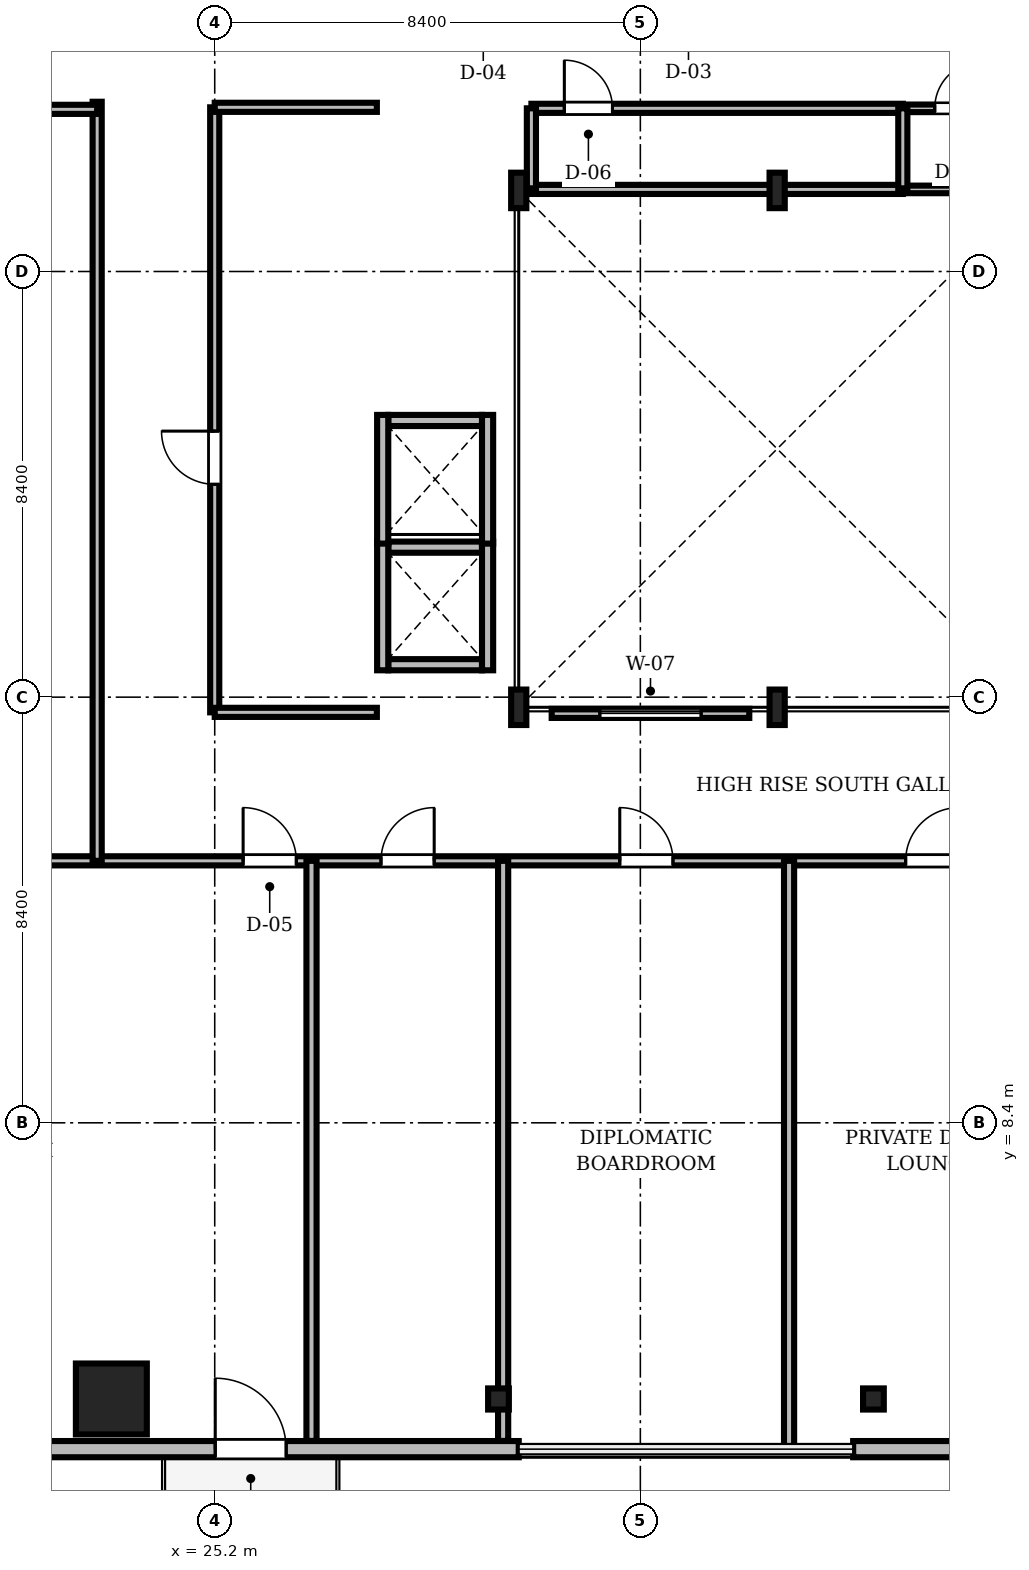
"""IFC4 building model, lengths in metres.
Left out: names, types, materials, properties, quantities, classifications, styles, units other than length and angle.
Written with IfcOpenShell. Run it as: python <this file> out.ifc"""

import sys

from ifc_helpers import new_model, si_unit, direction, frame, frame_2d, origin, origin_2d, place, context, subcontext, project, spatial, rectangle, i_section, extrude, source, transform, mapped, element, fill, save


model = new_model("IFC4")
c1 = context("Model", 3, precision=1e-05, world=origin(), true_north=direction((0.0, 1.0)))
c2 = subcontext(c1, "Body", "Model", "MODEL_VIEW")
j1 = project(units=[si_unit("LENGTHUNIT", "METRE"), si_unit("PLANEANGLEUNIT", "RADIAN")], contexts=[c1])
p1 = place(None, origin())
s1 = spatial("IfcSite", under=j1, at=p1, CompositionType="ELEMENT")
p2 = place(p1, origin())
s2 = spatial("IfcBuilding", under=s1, at=p2, CompositionType="ELEMENT")
p3 = place(p2, frame((0.0, 0.0, 233.55)))
s3 = spatial("IfcBuildingStorey", under=s2, at=p3, CompositionType="ELEMENT", Elevation=233.55)
m1 = source(origin(), c2, "Body", "SweptSolid", [
    extrude(i_section(OverallWidth=0.3, OverallDepth=0.7, WebThickness=0.017, FlangeThickness=0.032, FilletRadius=0.027, at=origin_2d()), origin(), (0.0, 0.0, 1.0), 3.1),
])
for number, where, z_axis, x_axis in (
    (1, (31.2, 16.6, 0.0), (0.0, 0.0, 1.0), (1.0, 0.0, 0.0)),
    (2, (36.3, 16.6, 0.0), (0.0, 0.0, 1.0), (1.0, 0.0, 0.0)),
    (3, (36.3, 26.8, 0.0), (0.0, 0.0, 1.0), (1.0, 0.0, 0.0)),
    (4, (31.2, 26.8, 0.0), (0.0, 0.0, 1.0), (1.0, 0.0, 0.0)),
):
    element("IfcColumn", number, at=place(p3, frame(where, z_axis=z_axis, x_axis=x_axis)), inside=s3, PredefinedType="COLUMN", context=c2, shape_type="MappedRepresentation", body=[
        mapped(m1, transform((0.0, 0.0, 0.0), scale=1.0)),
    ])
m2 = source(origin(), c2, "Body", "SweptSolid", [
    extrude(rectangle(XDim=1.4, YDim=1.4, at=origin_2d()), origin(), (0.0, 0.0, 1.0), 3.1),
])
p4 = place(p3, frame((23.16, 2.95, 0.0), z_axis=(0.0, 0.0, 1.0), x_axis=(1.0, 0.0, 0.0)))
e5 = element("IfcColumn", 5, at=p4, inside=s3, PredefinedType="COLUMN", context=c2, shape_type="MappedRepresentation", body=[
    mapped(m2, transform((0.0, 0.0, 0.0), scale=1.0)),
])
m3 = source(origin(), c2, "Body", "SweptSolid", [
    extrude(i_section(OverallWidth=0.409, OverallDepth=0.417, WebThickness=0.021, FlangeThickness=0.033, FilletRadius=0.015, at=origin_2d()), origin(), (0.0, 0.0, 1.0), 3.1),
])
for number, where, z_axis, x_axis in (
    (6, (30.8, 2.95, 0.0), (0.0, 0.0, 1.0), (1.0, 0.0, 0.0)),
    (7, (38.2, 2.95, 0.0), (0.0, 0.0, 1.0), (1.0, 0.0, 0.0)),
):
    element("IfcColumn", number, at=place(p3, frame(where, z_axis=z_axis, x_axis=x_axis)), inside=s3, PredefinedType="COLUMN", context=c2, shape_type="MappedRepresentation", body=[
        mapped(m3, transform((0.0, 0.0, 0.0), scale=1.0)),
    ])
m4 = source(origin(), c2, "Body", "SweptSolid", [
    extrude(rectangle(XDim=15.6, YDim=0.32, at=frame_2d((7.8, 0.0))), origin(), (0.0, 0.0, 1.0), 3.1),
])
p5 = place(p3, frame((15.6, 1.96, 0.0), z_axis=(0.0, 0.0, 1.0), x_axis=(1.0, 0.0, 0.0)))
e8 = element("IfcWall", 8, at=p5, inside=s3, PredefinedType="SOLIDWALL", context=c2, shape_type="MappedRepresentation", body=[
    mapped(m4, transform((0.0, 0.0, 0.0), scale=1.0)),
])
m5 = source(origin(), c2, "Body", "SweptSolid", [
    extrude(rectangle(XDim=1.4, YDim=2.3, at=frame_2d((0.7, 1.15))), frame((0.0, 0.17, 0.0), z_axis=(0.0, -1.0, 0.0), x_axis=(1.0, 0.0, 0.0)), (0.0, 0.0, 1.0), 0.34),
])
p6 = place(p5, frame((9.61, 0.0, 0.0)))
e9 = element("IfcOpeningElement", 9, at=p6, cuts=e8, PredefinedType="OPENING", context=c2, shape_type="MappedRepresentation", body=[
    mapped(m5, transform((0.0, 0.0, 0.0), scale=1.0)),
])
m6 = source(origin(), c2, "Body", "SweptSolid", [
    extrude(rectangle(XDim=2.8, YDim=2.4, at=frame_2d((1.4, 1.2))), frame((0.0, 0.17, 0.0), z_axis=(0.0, -1.0, 0.0), x_axis=(1.0, 0.0, 0.0)), (0.0, 0.0, 1.0), 0.34),
])
p7 = place(p5, frame((2.705, 0.0, 0.44)))
e10 = element("IfcOpeningElement", 10, at=p7, cuts=e8, PredefinedType="OPENING", context=c2, shape_type="MappedRepresentation", body=[
    mapped(m6, transform((0.0, 0.0, 0.0), scale=1.0)),
])
p8 = place(p3, frame((37.8, 1.96, 0.0), z_axis=(0.0, 0.0, 1.0), x_axis=(1.0, 0.0, 0.0)))
e11 = element("IfcWall", 11, at=p8, inside=s3, PredefinedType="SOLIDWALL", context=c2, shape_type="MappedRepresentation", body=[
    mapped(m4, transform((0.0, 0.0, 0.0), scale=1.0)),
])
p9 = place(p8, frame((10.545, 0.0, 0.44)))
e12 = element("IfcOpeningElement", 12, at=p9, cuts=e11, PredefinedType="OPENING", context=c2, shape_type="MappedRepresentation", body=[
    mapped(m6, transform((0.0, 0.0, 0.0), scale=1.0)),
])
m7 = source(origin(), c2, "Body", "SweptSolid", [
    extrude(rectangle(XDim=1.85, YDim=0.22, at=frame_2d((0.925, 0.0))), origin(), (0.0, 0.0, 1.0), 2.542),
])
p10 = place(p3, frame((28.625, 17.44, 0.0), z_axis=(0.0, 0.0, 1.0), x_axis=(1.0, 0.0, 0.0)))
e13 = element("IfcWall", 13, at=p10, inside=s3, PredefinedType="SOLIDWALL", context=c2, shape_type="MappedRepresentation", body=[
    mapped(m7, transform((0.0, 0.0, 0.0), scale=1.0)),
])
m8 = source(origin(), c2, "Body", "SweptSolid", [
    extrude(rectangle(XDim=1.85, YDim=0.22, at=frame_2d((0.925, 0.0))), origin(), (0.0, 0.0, 1.0), 3.1),
])
p11 = place(p3, frame((28.625, 19.76, 0.0), z_axis=(0.0, 0.0, 1.0), x_axis=(1.0, 0.0, 0.0)))
e14 = element("IfcWall", 14, at=p11, inside=s3, PredefinedType="SOLIDWALL", context=c2, shape_type="MappedRepresentation", body=[
    mapped(m8, transform((0.0, 0.0, 0.0), scale=1.0)),
])
m9 = source(origin(), c2, "Body", "SweptSolid", [
    extrude(rectangle(XDim=2.54, YDim=0.22, at=frame_2d((1.27, 0.0))), origin(), (0.0, 0.0, 1.0), 2.542),
])
p12 = place(p3, frame((28.515, 17.33, 0.0), z_axis=(0.0, 0.0, 1.0), x_axis=(0.0, 1.0, 0.0)))
e15 = element("IfcWall", 15, at=p12, inside=s3, PredefinedType="SOLIDWALL", context=c2, shape_type="MappedRepresentation", body=[
    mapped(m9, transform((0.0, 0.0, 0.0), scale=1.0)),
])
m10 = source(origin(), c2, "Body", "SweptSolid", [
    extrude(rectangle(XDim=2.54, YDim=0.22, at=frame_2d((1.27, 0.0))), origin(), (0.0, 0.0, 1.0), 3.1),
])
p13 = place(p3, frame((30.585, 17.33, 0.0), z_axis=(0.0, 0.0, 1.0), x_axis=(0.0, 1.0, 0.0)))
e16 = element("IfcWall", 16, at=p13, inside=s3, PredefinedType="SOLIDWALL", context=c2, shape_type="MappedRepresentation", body=[
    mapped(m10, transform((0.0, 0.0, 0.0), scale=1.0)),
])
p14 = place(p3, frame((28.625, 22.26, 0.0), z_axis=(0.0, 0.0, 1.0), x_axis=(1.0, 0.0, 0.0)))
e17 = element("IfcWall", 17, at=p14, inside=s3, PredefinedType="SOLIDWALL", context=c2, shape_type="MappedRepresentation", body=[
    mapped(m8, transform((0.0, 0.0, 0.0), scale=1.0)),
])
for number, where, z_axis, x_axis in (
    (18, (28.515, 19.83, 0.0), (0.0, 0.0, 1.0), (0.0, 1.0, 0.0)),
    (19, (30.585, 19.83, 0.0), (0.0, 0.0, 1.0), (0.0, 1.0, 0.0)),
):
    element("IfcWall", number, at=place(p3, frame(where, z_axis=z_axis, x_axis=x_axis)), inside=s3, PredefinedType="SOLIDWALL", context=c2, shape_type="MappedRepresentation", body=[
        mapped(m10, transform((0.0, 0.0, 0.0), scale=1.0)),
    ])
m11 = source(origin(), c2, "Body", "SweptSolid", [
    extrude(rectangle(XDim=46.156, YDim=0.18, at=frame_2d((23.078, 0.0))), origin(), (0.0, 0.0, 1.0), 2.376),
])
p15 = place(p3, frame((11.422, 13.57, 0.0), z_axis=(0.0, 0.0, 1.0), x_axis=(1.0, 0.0, 0.0)))
e20 = element("IfcWall", 20, at=p15, inside=s3, PredefinedType="PARTITIONING", context=c2, shape_type="MappedRepresentation", body=[
    mapped(m11, transform((0.0, 0.0, 0.0), scale=1.0)),
])
m12 = source(origin(), c2, "Body", "SweptSolid", [
    extrude(rectangle(XDim=1.05, YDim=2.2, at=frame_2d((0.525, 1.1))), frame((0.0, 0.1, 0.0), z_axis=(0.0, -1.0, 0.0), x_axis=(1.0, 0.0, 0.0)), (0.0, 0.0, 1.0), 0.2),
])
p16 = place(p15, frame((14.338, 0.0, 0.0)))
e21 = element("IfcOpeningElement", 21, at=p16, cuts=e20, PredefinedType="OPENING", context=c2, shape_type="MappedRepresentation", body=[
    mapped(m12, transform((0.0, 0.0, 0.0), scale=1.0)),
])
p17 = place(p15, frame((17.059, 0.0, 0.0)))
e22 = element("IfcOpeningElement", 22, at=p17, cuts=e20, PredefinedType="OPENING", context=c2, shape_type="MappedRepresentation", body=[
    mapped(m12, transform((0.0, 0.0, 0.0), scale=1.0)),
])
p18 = place(p15, frame((21.772, 0.0, 0.0)))
e23 = element("IfcOpeningElement", 23, at=p18, cuts=e20, PredefinedType="OPENING", context=c2, shape_type="MappedRepresentation", body=[
    mapped(m12, transform((0.0, 0.0, 0.0), scale=1.0)),
])
p19 = place(p15, frame((27.414, 0.0, 0.0)))
e24 = element("IfcOpeningElement", 24, at=p19, cuts=e20, PredefinedType="OPENING", context=c2, shape_type="MappedRepresentation", body=[
    mapped(m12, transform((0.0, 0.0, 0.0), scale=1.0)),
])
p20 = place(p15, frame((33.057, 0.0, 0.0)))
e25 = element("IfcOpeningElement", 25, at=p20, cuts=e20, PredefinedType="OPENING", context=c2, shape_type="MappedRepresentation", body=[
    mapped(m12, transform((0.0, 0.0, 0.0), scale=1.0)),
])
p21 = place(p15, frame((37.498, 0.0, 0.0)))
e26 = element("IfcOpeningElement", 26, at=p21, cuts=e20, PredefinedType="OPENING", context=c2, shape_type="MappedRepresentation", body=[
    mapped(m12, transform((0.0, 0.0, 0.0), scale=1.0)),
])
m13 = source(origin(), c2, "Body", "SweptSolid", [
    extrude(rectangle(XDim=11.94, YDim=0.18, at=frame_2d((5.97, 0.0))), origin(), (0.0, 0.0, 1.0), 2.542),
])
p22 = place(p3, frame((25.2, 16.5, 0.0), z_axis=(0.0, 0.0, 1.0), x_axis=(0.0, 1.0, 0.0)))
e27 = element("IfcWall", 27, at=p22, inside=s3, PredefinedType="PARTITIONING", context=c2, shape_type="MappedRepresentation", body=[
    mapped(m13, transform((0.0, 0.0, 0.0), scale=1.0)),
])
p23 = place(p22, frame((4.5, 0.0, 0.0)))
e28 = element("IfcOpeningElement", 28, at=p23, cuts=e27, PredefinedType="OPENING", context=c2, shape_type="MappedRepresentation", body=[
    mapped(m12, transform((0.0, 0.0, 0.0), scale=1.0)),
])
m14 = source(origin(), c2, "Body", "SweptSolid", [
    extrude(rectangle(XDim=7.33, YDim=0.18, at=frame_2d((3.665, 0.0))), origin(), (0.0, 0.0, 1.0), 2.732),
])
p24 = place(p3, frame((31.45, 28.42, 0.0), z_axis=(0.0, 0.0, 1.0), x_axis=(1.0, 0.0, 0.0)))
e29 = element("IfcWall", 29, at=p24, inside=s3, PredefinedType="PARTITIONING", context=c2, shape_type="MappedRepresentation", body=[
    mapped(m14, transform((0.0, 0.0, 0.0), scale=1.0)),
])
m15 = source(origin(), c2, "Body", "SweptSolid", [
    extrude(rectangle(XDim=0.95, YDim=2.15, at=frame_2d((0.475, 1.075))), frame((0.0, 0.1, 0.0), z_axis=(0.0, -1.0, 0.0), x_axis=(1.0, 0.0, 0.0)), (0.0, 0.0, 1.0), 0.2),
])
p25 = place(p24, frame((0.65, 0.0, 0.0)))
e30 = element("IfcOpeningElement", 30, at=p25, cuts=e29, PredefinedType="OPENING", context=c2, shape_type="MappedRepresentation", body=[
    mapped(m15, transform((0.0, 0.0, 0.0), scale=1.0)),
])
m16 = source(origin(), c2, "Body", "SweptSolid", [
    extrude(rectangle(XDim=2.74, YDim=0.15, at=frame_2d((1.37, 0.0))), origin(), (0.0, 0.0, 1.0), 3.1),
])
p26 = place(p3, frame((38.78, 28.42, 0.0), z_axis=(0.0, 0.0, 1.0), x_axis=(1.0, 0.0, 0.0)))
e31 = element("IfcWall", 31, at=p26, inside=s3, PredefinedType="PARTITIONING", context=c2, shape_type="MappedRepresentation", body=[
    mapped(m16, transform((0.0, 0.0, 0.0), scale=1.0)),
])
m17 = source(origin(), c2, "Body", "SweptSolid", [
    extrude(rectangle(XDim=0.92, YDim=2.1, at=frame_2d((0.46, 1.05))), frame((0.0, 0.085, 0.0), z_axis=(0.0, -1.0, 0.0), x_axis=(1.0, 0.0, 0.0)), (0.0, 0.0, 1.0), 0.17),
])
p27 = place(p26, frame((0.63, 0.0, 0.0)))
e32 = element("IfcOpeningElement", 32, at=p27, cuts=e31, PredefinedType="OPENING", context=c2, shape_type="MappedRepresentation", body=[
    mapped(m17, transform((0.0, 0.0, 0.0), scale=1.0)),
])
m18 = source(origin(), c2, "Body", "SweptSolid", [
    extrude(rectangle(XDim=14.98, YDim=0.18, at=frame_2d((7.49, 0.0))), origin(), (0.0, 0.0, 1.0), 2.542),
])
p28 = place(p3, frame((22.88, 13.57, 0.0), z_axis=(0.0, 0.0, 1.0), x_axis=(0.0, 1.0, 0.0)))
e33 = element("IfcWall", 33, at=p28, inside=s3, PredefinedType="PARTITIONING", context=c2, shape_type="MappedRepresentation", body=[
    mapped(m18, transform((0.0, 0.0, 0.0), scale=1.0)),
])
m19 = source(origin(), c2, "Body", "SweptSolid", [
    extrude(rectangle(XDim=11.65, YDim=0.18, at=frame_2d((5.825, 0.0))), origin(), (0.0, 0.0, 1.0), 2.376),
])
p29 = place(p3, frame((11.23, 28.4, 0.0), z_axis=(0.0, 0.0, 1.0), x_axis=(1.0, 0.0, 0.0)))
e34 = element("IfcWall", 34, at=p29, inside=s3, PredefinedType="PARTITIONING", context=c2, shape_type="MappedRepresentation", body=[
    mapped(m19, transform((0.0, 0.0, 0.0), scale=1.0)),
])
m20 = source(origin(), c2, "Body", "SweptSolid", [
    extrude(rectangle(XDim=11.448, YDim=0.2, at=frame_2d((5.724, 0.0))), origin(), (0.0, 0.0, 1.0), 2.376),
])
for number, where, z_axis, x_axis in (
    (35, (27.11, 2.122, 0.0), (0.0, 0.0, 1.0), (0.0, 1.0, 0.0)),
    (36, (30.892, 2.122, 0.0), (0.0, 0.0, 1.0), (0.0, 1.0, 0.0)),
):
    element("IfcWall", number, at=place(p3, frame(where, z_axis=z_axis, x_axis=x_axis)), inside=s3, PredefinedType="PARTITIONING", context=c2, shape_type="MappedRepresentation", body=[
        mapped(m20, transform((0.0, 0.0, 0.0), scale=1.0)),
    ])
m21 = source(origin(), c2, "Body", "SweptSolid", [
    extrude(rectangle(XDim=11.64, YDim=0.2, at=frame_2d((5.82, 0.0))), origin(), (0.0, 0.0, 1.0), 2.376),
])
p30 = place(p3, frame((36.535, 1.93, 0.0), z_axis=(0.0, 0.0, 1.0), x_axis=(0.0, 1.0, 0.0)))
e37 = element("IfcWall", 37, at=p30, inside=s3, PredefinedType="PARTITIONING", context=c2, shape_type="MappedRepresentation", body=[
    mapped(m21, transform((0.0, 0.0, 0.0), scale=1.0)),
])
m22 = source(origin(), c2, "Body", "SweptSolid", [
    extrude(rectangle(XDim=7.33, YDim=0.18, at=frame_2d((3.665, 0.0))), origin(), (0.0, 0.0, 1.0), 2.642),
])
p31 = place(p3, frame((31.45, 26.82, 0.0), z_axis=(0.0, 0.0, 1.0), x_axis=(1.0, 0.0, 0.0)))
e38 = element("IfcWall", 38, at=p31, inside=s3, PredefinedType="PARTITIONING", context=c2, shape_type="MappedRepresentation", body=[
    mapped(m22, transform((0.0, 0.0, 0.0), scale=1.0)),
])
m23 = source(origin(), c2, "Body", "SweptSolid", [
    extrude(rectangle(XDim=3.2, YDim=0.18, at=frame_2d((1.6, 0.0))), origin(), (0.0, 0.0, 1.0), 3.1),
])
for number, where, z_axis, x_axis in (
    (39, (25.2, 16.5, 0.0), (0.0, 0.0, 1.0), (1.0, 0.0, 0.0)),
    (40, (25.2, 28.44, 0.0), (0.0, 0.0, 1.0), (1.0, 0.0, 0.0)),
):
    element("IfcWall", number, at=place(p3, frame(where, z_axis=z_axis, x_axis=x_axis)), inside=s3, PredefinedType="PARTITIONING", context=c2, shape_type="MappedRepresentation", body=[
        mapped(m23, transform((0.0, 0.0, 0.0), scale=1.0)),
    ])
m24 = source(origin(), c2, "Body", "SweptSolid", [
    extrude(rectangle(XDim=2.74, YDim=0.15, at=frame_2d((1.37, 0.0))), origin(), (0.0, 0.0, 1.0), 2.542),
])
p32 = place(p3, frame((38.78, 26.82, 0.0), z_axis=(0.0, 0.0, 1.0), x_axis=(1.0, 0.0, 0.0)))
e41 = element("IfcWall", 41, at=p32, inside=s3, PredefinedType="PARTITIONING", context=c2, shape_type="MappedRepresentation", body=[
    mapped(m24, transform((0.0, 0.0, 0.0), scale=1.0)),
])
m25 = source(origin(), c2, "Body", "SweptSolid", [
    extrude(rectangle(XDim=1.6, YDim=0.18, at=frame_2d((0.8, 0.0))), origin(), (0.0, 0.0, 1.0), 2.642),
])
for number, where, z_axis, x_axis in (
    (42, (31.45, 26.82, 0.0), (0.0, 0.0, 1.0), (0.0, 1.0, 0.0)),
    (43, (38.78, 26.82, 0.0), (0.0, 0.0, 1.0), (0.0, 1.0, 0.0)),
):
    element("IfcWall", number, at=place(p3, frame(where, z_axis=z_axis, x_axis=x_axis)), inside=s3, PredefinedType="PARTITIONING", context=c2, shape_type="MappedRepresentation", body=[
        mapped(m25, transform((0.0, 0.0, 0.0), scale=1.0)),
    ])
m26 = source(origin(), c2, "Body", "SweptSolid", [
    extrude(rectangle(XDim=3.9, YDim=0.18, at=frame_2d((1.95, 0.0))), origin(), (0.0, 0.0, 1.0), 2.642),
])
p33 = place(p3, frame((31.85, 16.48, 0.0), z_axis=(0.0, 0.0, 1.0), x_axis=(1.0, 0.0, 0.0)))
e44 = element("IfcWall", 44, at=p33, inside=s3, PredefinedType="PARTITIONING", context=c2, shape_type="MappedRepresentation", body=[
    mapped(m26, transform((0.0, 0.0, 0.0), scale=1.0)),
])
m27 = source(origin(), c2, "Body", "SweptSolid", [
    extrude(rectangle(XDim=2.0, YDim=1.9, at=frame_2d((1.0, 0.95))), frame((0.0, 0.1, 0.0), z_axis=(0.0, -1.0, 0.0), x_axis=(1.0, 0.0, 0.0)), (0.0, 0.0, 1.0), 0.2),
])
p34 = place(p33, frame((0.95, 0.0, 0.55)))
e45 = element("IfcOpeningElement", 45, at=p34, cuts=e44, PredefinedType="OPENING", context=c2, shape_type="MappedRepresentation", body=[
    mapped(m27, transform((0.0, 0.0, 0.0), scale=1.0)),
])
m28 = source(origin(), c2, "Body", "SweptSolid", [
    extrude(rectangle(XDim=1.4, YDim=2.3, at=frame_2d((0.7, 1.15))), frame((0.0, 0.025, 0.0), z_axis=(0.0, -1.0, 0.0), x_axis=(1.0, 0.0, 0.0)), (0.0, 0.0, 1.0), 0.05),
])
p35 = place(p6, frame((1.4, 0.0, 0.0), z_axis=(0.0, 0.0, 1.0), x_axis=(-1.0, 0.0, 0.0)))
e46 = element("IfcDoor", 46, at=p35, inside=s3, OperationType="DOUBLE_DOOR_SLIDING", PredefinedType="DOOR", context=c2, shape_type="MappedRepresentation", body=[
    mapped(m28, transform((0.0, 0.0, 0.0), scale=1.0)),
])
fill(e9, e46)
m29 = source(origin(), c2, "Body", "SweptSolid", [
    extrude(rectangle(XDim=1.05, YDim=2.2, at=frame_2d((0.525, 1.1))), frame((0.0, 0.025, 0.0), z_axis=(0.0, -1.0, 0.0), x_axis=(1.0, 0.0, 0.0)), (0.0, 0.0, 1.0), 0.05),
])
p36 = place(p16, origin())
e47 = element("IfcDoor", 47, at=p36, inside=s3, OperationType="SINGLE_SWING_LEFT", PredefinedType="DOOR", context=c2, shape_type="MappedRepresentation", body=[
    mapped(m29, transform((0.0, 0.0, 0.0), scale=1.0)),
])
fill(e21, e47)
p37 = place(p17, origin())
e48 = element("IfcDoor", 48, at=p37, inside=s3, OperationType="SINGLE_SWING_RIGHT", PredefinedType="DOOR", context=c2, shape_type="MappedRepresentation", body=[
    mapped(m29, transform((0.0, 0.0, 0.0), scale=1.0)),
])
fill(e22, e48)
p38 = place(p18, origin())
e49 = element("IfcDoor", 49, at=p38, inside=s3, OperationType="SINGLE_SWING_LEFT", PredefinedType="DOOR", context=c2, shape_type="MappedRepresentation", body=[
    mapped(m29, transform((0.0, 0.0, 0.0), scale=1.0)),
])
fill(e23, e49)
p39 = place(p19, origin())
e50 = element("IfcDoor", 50, at=p39, inside=s3, OperationType="SINGLE_SWING_RIGHT", PredefinedType="DOOR", context=c2, shape_type="MappedRepresentation", body=[
    mapped(m29, transform((0.0, 0.0, 0.0), scale=1.0)),
])
fill(e24, e50)
p40 = place(p23, origin())
e51 = element("IfcDoor", 51, at=p40, inside=s3, OperationType="SINGLE_SWING_RIGHT", PredefinedType="DOOR", context=c2, shape_type="MappedRepresentation", body=[
    mapped(m29, transform((0.0, 0.0, 0.0), scale=1.0)),
])
fill(e28, e51)
m30 = source(origin(), c2, "Body", "SweptSolid", [
    extrude(rectangle(XDim=0.95, YDim=2.15, at=frame_2d((0.475, 1.075))), frame((0.0, 0.025, 0.0), z_axis=(0.0, -1.0, 0.0), x_axis=(1.0, 0.0, 0.0)), (0.0, 0.0, 1.0), 0.05),
])
p41 = place(p25, origin())
e52 = element("IfcDoor", 52, at=p41, inside=s3, OperationType="SINGLE_SWING_LEFT", PredefinedType="DOOR", context=c2, shape_type="MappedRepresentation", body=[
    mapped(m30, transform((0.0, 0.0, 0.0), scale=1.0)),
])
fill(e30, e52)
m31 = source(origin(), c2, "Body", "SweptSolid", [
    extrude(rectangle(XDim=0.92, YDim=2.1, at=frame_2d((0.46, 1.05))), frame((0.0, 0.025, 0.0), z_axis=(0.0, -1.0, 0.0), x_axis=(1.0, 0.0, 0.0)), (0.0, 0.0, 1.0), 0.05),
])
p42 = place(p27, origin())
e53 = element("IfcDoor", 53, at=p42, inside=s3, OperationType="SINGLE_SWING_RIGHT", PredefinedType="DOOR", context=c2, shape_type="MappedRepresentation", body=[
    mapped(m31, transform((0.0, 0.0, 0.0), scale=1.0)),
])
fill(e32, e53)
m32 = source(origin(), c2, "Body", "SweptSolid", [
    extrude(rectangle(XDim=2.0, YDim=1.9, at=frame_2d((1.0, 0.95))), frame((0.0, 0.03, 0.0), z_axis=(0.0, -1.0, 0.0), x_axis=(1.0, 0.0, 0.0)), (0.0, 0.0, 1.0), 0.06),
])
p43 = place(p34, origin())
e54 = element("IfcWindow", 54, at=p43, inside=s3, PartitioningType="SINGLE_PANEL", PredefinedType="WINDOW", context=c2, shape_type="MappedRepresentation", body=[
    mapped(m32, transform((0.0, 0.0, 0.0), scale=1.0)),
])
fill(e45, e54)
save(model, sys.argv[1])
